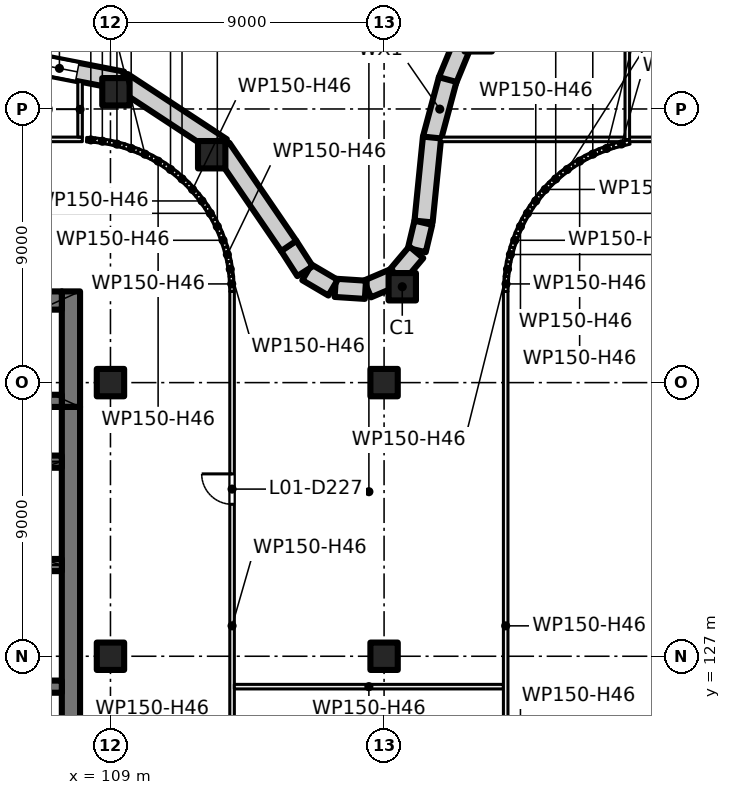
"""IFC4 building model, lengths in metres.
Left out: names, types, materials, properties, quantities, classifications, styles, units other than length and angle.
Written with IfcOpenShell. Run it as: python <this file> out.ifc"""

import sys

from ifc_helpers import new_model, si_unit, direction, frame, frame_2d, origin, origin_2d, place, context, subcontext, project, spatial, rectangle, extrude, element, fill, save


model = new_model("IFC4")
c1 = context("Model", 3, precision=1e-05, world=origin(), true_north=direction((0.0, 1.0)))
c2 = subcontext(c1, "Body", "Model", "MODEL_VIEW")
j1 = project(units=[si_unit("LENGTHUNIT", "METRE"), si_unit("PLANEANGLEUNIT", "RADIAN")], contexts=[c1])
p1 = place(None, origin())
s1 = spatial("IfcSite", under=j1, at=p1, CompositionType="ELEMENT")
p2 = place(p1, origin())
s2 = spatial("IfcBuilding", under=s1, at=p2, CompositionType="ELEMENT")
p3 = place(p2, frame((0.0, 0.0, 7.5)))
s3 = spatial("IfcBuildingStorey", under=s2, at=p3, CompositionType="ELEMENT", Elevation=7.5)
for number, where, z_axis, x_axis in (
    (1, (109.0, 127.0, 0.0), (0.0, 0.0, 1.0), (1.0, 0.0, 0.0)),
    (2, (109.0, 136.0, 0.0), (0.0, 0.0, 1.0), (1.0, 0.0, 0.0)),
    (3, (118.0, 127.0, 0.0), (0.0, 0.0, 1.0), (1.0, 0.0, 0.0)),
    (4, (118.0, 136.0, 0.0), (0.0, 0.0, 1.0), (1.0, 0.0, 0.0)),
    (5, (109.18, 145.567, 0.0), (0.0, 0.0, 1.0), (1.0, 0.0, 0.0)),
    (6, (112.329, 143.496, 0.0), (0.0, 0.0, 1.0), (1.0, 0.0, 0.0)),
    (7, (118.598, 139.153, 0.0), (0.0, 0.0, 1.0), (1.0, 0.0, 0.0)),
):
    element("IfcColumn", number, at=place(p3, frame(where, z_axis=z_axis, x_axis=x_axis)), inside=s3, PredefinedType="COLUMN", context=c2, shape_type="SweptSolid", body=[
        extrude(rectangle(XDim=0.9, YDim=0.9, at=origin_2d()), origin(), (0.0, 0.0, 1.0), 5.0),
    ])
p4 = place(p3, frame((107.7, 139.0, 0.0), z_axis=(0.0, 0.0, 1.0), x_axis=(0.0, -1.0, 0.0)))
e8 = element("IfcWall", 8, at=p4, inside=s3, PredefinedType="SHEAR", context=c2, shape_type="SweptSolid", body=[
    extrude(rectangle(XDim=3.8, YDim=0.6, at=frame_2d((1.9, 0.0))), origin(), (0.0, 0.0, 1.0), 5.0),
])
p5 = place(p3, frame((107.7, 135.2, 0.0), z_axis=(0.0, 0.0, 1.0), x_axis=(0.0, -1.0, 0.0)))
e9 = element("IfcWall", 9, at=p5, inside=s3, PredefinedType="SHEAR", context=c2, shape_type="SweptSolid", body=[
    extrude(rectangle(XDim=14.4, YDim=0.6, at=frame_2d((7.2, 0.0))), origin(), (0.0, 0.0, 1.0), 5.0),
])
p6 = place(p3, frame((107.4, 138.7, 0.0), z_axis=(0.0, 0.0, 1.0), x_axis=(-1.0, 0.0, 0.0)))
e10 = element("IfcWall", 10, at=p6, inside=s3, PredefinedType="SHEAR", context=c2, shape_type="SweptSolid", body=[
    extrude(rectangle(XDim=7.8, YDim=0.6, at=frame_2d((3.9, 0.0))), origin(), (0.0, 0.0, 1.0), 5.0),
])
p7 = place(p3, frame((107.4, 135.4, 0.0), z_axis=(0.0, 0.0, 1.0), x_axis=(-1.0, 0.0, 0.0)))
e11 = element("IfcWall", 11, at=p7, inside=s3, PredefinedType="SHEAR", context=c2, shape_type="SweptSolid", body=[
    extrude(rectangle(XDim=7.8, YDim=0.4, at=frame_2d((3.9, 0.0))), origin(), (0.0, 0.0, 1.0), 5.0),
])
p8 = place(p3, frame((107.4, 130.0, 0.0), z_axis=(0.0, 0.0, 1.0), x_axis=(-1.0, 0.0, 0.0)))
e12 = element("IfcWall", 12, at=p8, inside=s3, PredefinedType="SHEAR", context=c2, shape_type="SweptSolid", body=[
    extrude(rectangle(XDim=12.2, YDim=0.4, at=frame_2d((6.1, 0.0))), origin(), (0.0, 0.0, 1.0), 5.0),
])
p9 = place(p8, frame((5.45, 0.0, 0.0)))
e13 = element("IfcOpeningElement", 13, at=p9, cuts=e12, PredefinedType="OPENING", context=c2, shape_type="SweptSolid", body=[
    extrude(rectangle(XDim=1.1, YDim=2.1, at=frame_2d((0.55, 1.05))), frame((0.0, 0.21, 0.0), z_axis=(0.0, -1.0, 0.0), x_axis=(1.0, 0.0, 0.0)), (0.0, 0.0, 1.0), 0.42),
])
p10 = place(p8, frame((7.85, 0.0, 0.0)))
e14 = element("IfcOpeningElement", 14, at=p10, cuts=e12, PredefinedType="OPENING", context=c2, shape_type="SweptSolid", body=[
    extrude(rectangle(XDim=1.1, YDim=2.1, at=frame_2d((0.55, 1.05))), frame((0.0, 0.21, 0.0), z_axis=(0.0, -1.0, 0.0), x_axis=(1.0, 0.0, 0.0)), (0.0, 0.0, 1.0), 0.42),
])
p11 = place(p3, frame((107.4, 133.4, 0.0), z_axis=(0.0, 0.0, 1.0), x_axis=(-1.0, 0.0, 0.0)))
e15 = element("IfcWall", 15, at=p11, inside=s3, PredefinedType="SHEAR", context=c2, shape_type="SweptSolid", body=[
    extrude(rectangle(XDim=12.2, YDim=0.4, at=frame_2d((6.1, 0.0))), origin(), (0.0, 0.0, 1.0), 5.0),
])
p12 = place(p11, frame((10.3, 0.0, 0.0)))
e16 = element("IfcOpeningElement", 16, at=p12, cuts=e15, PredefinedType="OPENING", context=c2, shape_type="SweptSolid", body=[
    extrude(rectangle(XDim=1.1, YDim=2.1, at=frame_2d((0.55, 1.05))), frame((0.0, 0.21, 0.0), z_axis=(0.0, -1.0, 0.0), x_axis=(1.0, 0.0, 0.0)), (0.0, 0.0, 1.0), 0.42),
])
p13 = place(p3, frame((107.4, 126.0, 0.0), z_axis=(0.0, 0.0, 1.0), x_axis=(-1.0, 0.0, 0.0)))
e17 = element("IfcWall", 17, at=p13, inside=s3, PredefinedType="SHEAR", context=c2, shape_type="SweptSolid", body=[
    extrude(rectangle(XDim=12.2, YDim=0.4, at=frame_2d((6.1, 0.0))), origin(), (0.0, 0.0, 1.0), 5.0),
])
p14 = place(p13, frame((10.25, 0.0, 0.0)))
e18 = element("IfcOpeningElement", 18, at=p14, cuts=e17, PredefinedType="OPENING", context=c2, shape_type="SweptSolid", body=[
    extrude(rectangle(XDim=1.1, YDim=2.1, at=frame_2d((0.55, 1.05))), frame((0.0, 0.21, 0.0), z_axis=(0.0, -1.0, 0.0), x_axis=(1.0, 0.0, 0.0)), (0.0, 0.0, 1.0), 0.42),
])
p15 = place(p13, frame((0.7, 0.0, 0.0)))
e19 = element("IfcOpeningElement", 19, at=p15, cuts=e17, PredefinedType="OPENING", context=c2, shape_type="SweptSolid", body=[
    extrude(rectangle(XDim=0.8, YDim=2.1, at=frame_2d((0.4, 1.05))), frame((0.0, 0.21, 0.0), z_axis=(0.0, -1.0, 0.0), x_axis=(1.0, 0.0, 0.0)), (0.0, 0.0, 1.0), 0.42),
])
p16 = place(p3, frame((120.079, 145.931, 0.0), z_axis=(0.0, 0.0, 1.0), x_axis=(0.382375593358, 0.924006983526, 0.0)))
e20 = element("IfcWall", 20, at=p16, inside=s3, PredefinedType="SOLIDWALL", context=c2, shape_type="SweptSolid", body=[
    extrude(rectangle(XDim=2.114, YDim=0.6, at=frame_2d((1.057, 0.0))), origin(), (0.0, 0.0, 1.0), 4.6),
])
p17 = place(p3, frame((119.571, 144.024, 0.0), z_axis=(0.0, 0.0, 1.0), x_axis=(0.25888565912, 0.965907974655, 0.0)))
e21 = element("IfcWall", 21, at=p17, inside=s3, PredefinedType="SOLIDWALL", context=c2, shape_type="SweptSolid", body=[
    extrude(rectangle(XDim=2.012, YDim=0.6, at=frame_2d((1.006, 0.0))), origin(), (0.0, 0.0, 1.0), 4.6),
])
p18 = place(p3, frame((119.299, 141.298, 0.0), z_axis=(0.0, 0.0, 1.0), x_axis=(0.100121632527, 0.994975205068, 0.0)))
e22 = element("IfcWall", 22, at=p18, inside=s3, PredefinedType="SOLIDWALL", context=c2, shape_type="SweptSolid", body=[
    extrude(rectangle(XDim=2.777, YDim=0.6, at=frame_2d((1.389, 0.0))), origin(), (0.0, 0.0, 1.0), 4.6),
])
p19 = place(p3, frame((119.077, 140.358, 0.0), z_axis=(0.0, 0.0, 1.0), x_axis=(0.231477954295, 0.972840149601, 0.0)))
e23 = element("IfcWall", 23, at=p19, inside=s3, PredefinedType="SOLIDWALL", context=c2, shape_type="SweptSolid", body=[
    extrude(rectangle(XDim=0.926, YDim=0.6, at=frame_2d((0.463, 0.0))), origin(), (0.0, 0.0, 1.0), 4.6),
])
for number, where, z_axis, x_axis in (
    (24, (118.417, 139.526, 0.0), (0.0, 0.0, 1.0), (0.645, 0.764, 0.0)),
    (25, (117.454, 139.081, 0.0), (0.0, 0.0, 1.0), (0.92, 0.392, 0.0)),
    (26, (116.393, 139.117, 0.0), (0.0, 0.0, 1.0), (0.998, -0.064, 0.0)),
    (27, (115.461, 139.627, 0.0), (0.0, 0.0, 1.0), (0.862, -0.507, 0.0)),
):
    element("IfcWall", number, at=place(p3, frame(where, z_axis=z_axis, x_axis=x_axis)), inside=s3, PredefinedType="SOLIDWALL", context=c2, shape_type="SweptSolid", body=[
        extrude(rectangle(XDim=0.996, YDim=0.6, at=frame_2d((0.498, 0.0))), origin(), (0.0, 0.0, 1.0), 4.6),
    ])
p20 = place(p3, frame((114.86, 140.502, 0.0), z_axis=(0.0, 0.0, 1.0), x_axis=(0.541339592117, -0.84080404733, 0.0)))
e28 = element("IfcWall", 28, at=p20, inside=s3, PredefinedType="SOLIDWALL", context=c2, shape_type="SweptSolid", body=[
    extrude(rectangle(XDim=0.996, YDim=0.6, at=frame_2d((0.498, 0.0))), origin(), (0.0, 0.0, 1.0), 4.6),
])
p21 = place(p3, frame((112.661, 143.72, 0.0), z_axis=(0.0, 0.0, 1.0), x_axis=(0.564314082571, -0.825560183277, 0.0)))
e29 = element("IfcWall", 29, at=p21, inside=s3, PredefinedType="SOLIDWALL", context=c2, shape_type="SweptSolid", body=[
    extrude(rectangle(XDim=3.905, YDim=0.6, at=frame_2d((1.953, 0.0))), origin(), (0.0, 0.0, 1.0), 4.6),
])
p22 = place(p3, frame((109.401, 145.9, 0.0), z_axis=(0.0, 0.0, 1.0), x_axis=(0.835543958523, -0.549423601037, 0.0)))
e30 = element("IfcWall", 30, at=p22, inside=s3, PredefinedType="SOLIDWALL", context=c2, shape_type="SweptSolid", body=[
    extrude(rectangle(XDim=3.906, YDim=0.6, at=frame_2d((1.953, 0.0))), origin(), (0.0, 0.0, 1.0), 4.6),
])
p23 = place(p3, frame((105.44, 146.702, 0.0), z_axis=(0.0, 0.0, 1.0), x_axis=(0.981593603981, -0.190981665674, 0.0)))
e31 = element("IfcWall", 31, at=p23, inside=s3, PredefinedType="SOLIDWALL", context=c2, shape_type="SweptSolid", body=[
    extrude(rectangle(XDim=4.025, YDim=0.6, at=frame_2d((2.013, 0.0))), origin(), (0.0, 0.0, 1.0), 4.6),
])
p24 = place(p23, frame((1.316, 0.0, 0.9)))
e32 = element("IfcOpeningElement", 32, at=p24, cuts=e31, PredefinedType="OPENING", context=c2, shape_type="SweptSolid", body=[
    extrude(rectangle(XDim=1.2, YDim=3.0, at=frame_2d((0.6, 1.5))), frame((0.0, 0.31, 0.0), z_axis=(0.0, -1.0, 0.0), x_axis=(1.0, 0.0, 0.0)), (0.0, 0.0, 1.0), 0.62),
])
p25 = place(p3, frame((72.075, 144.0, 0.0), z_axis=(0.0, 0.0, 1.0), x_axis=(1.0, 0.0, 0.0)))
e33 = element("IfcWall", 33, at=p25, inside=s3, PredefinedType="PARTITIONING", context=c2, shape_type="SweptSolid", body=[
    extrude(rectangle(XDim=36.0, YDim=0.15, at=frame_2d((18.0, 0.0))), origin(), (0.0, 0.0, 1.0), 4.6),
])
p26 = place(p25, frame((26.925, 0.0, 0.0)))
e34 = element("IfcOpeningElement", 34, at=p26, cuts=e33, PredefinedType="OPENING", context=c2, shape_type="SweptSolid", body=[
    extrude(rectangle(XDim=1.0, YDim=2.1, at=frame_2d((0.5, 1.05))), frame((0.0, 0.085, 0.0), z_axis=(0.0, -1.0, 0.0), x_axis=(1.0, 0.0, 0.0)), (0.0, 0.0, 1.0), 0.17),
])
p27 = place(p3, frame((108.0, 144.075, 0.0), z_axis=(0.0, 0.0, 1.0), x_axis=(0.0, 1.0, 0.0)))
e35 = element("IfcWall", 35, at=p27, inside=s3, PredefinedType="PARTITIONING", context=c2, shape_type="SweptSolid", body=[
    extrude(rectangle(XDim=1.823, YDim=0.15, at=frame_2d((0.912, 0.0))), origin(), (0.0, 0.0, 1.0), 4.6),
])
p28 = place(p3, frame((108.214, 143.99, 0.0), z_axis=(0.0, 0.0, 1.0), x_axis=(0.99876534507, -0.049676810357, 0.0)))
e36 = element("IfcWall", 36, at=p28, inside=s3, PredefinedType="PARTITIONING", context=c2, shape_type="SweptSolid", body=[
    extrude(rectangle(XDim=0.28, YDim=0.15, at=frame_2d((0.14, 0.0))), origin(), (0.0, 0.0, 1.0), 4.6),
])
p29 = place(p3, frame((108.486, 143.977, 0.0), z_axis=(0.0, 0.0, 1.0), x_axis=(0.988925572052, -0.148412307247, 0.0)))
e37 = element("IfcWall", 37, at=p29, inside=s3, PredefinedType="PARTITIONING", context=c2, shape_type="SweptSolid", body=[
    extrude(rectangle(XDim=0.499, YDim=0.15, at=frame_2d((0.249, 0.0))), origin(), (0.0, 0.0, 1.0), 4.6),
])
p30 = place(p3, frame((108.971, 143.905, 0.0), z_axis=(0.0, 0.0, 1.0), x_axis=(0.970113715952, -0.242650732785, 0.0)))
e38 = element("IfcWall", 38, at=p30, inside=s3, PredefinedType="PARTITIONING", context=c2, shape_type="SweptSolid", body=[
    extrude(rectangle(XDim=0.499, YDim=0.15, at=frame_2d((0.25, 0.0))), origin(), (0.0, 0.0, 1.0), 4.6),
])
for number, where, z_axis, x_axis in (
    (39, (109.447, 143.786, 0.0), (0.0, 0.0, 1.0), (0.941, -0.337, 0.0)),
    (40, (109.91, 143.621, 0.0), (0.0, 0.0, 1.0), (0.904, -0.428, 0.0)),
):
    element("IfcWall", number, at=place(p3, frame(where, z_axis=z_axis, x_axis=x_axis)), inside=s3, PredefinedType="PARTITIONING", context=c2, shape_type="SweptSolid", body=[
        extrude(rectangle(XDim=0.498, YDim=0.15, at=frame_2d((0.249, 0.0))), origin(), (0.0, 0.0, 1.0), 4.6),
    ])
p31 = place(p3, frame((110.354, 143.412, 0.0), z_axis=(0.0, 0.0, 1.0), x_axis=(0.85671397893, -0.515791778052, 0.0)))
e41 = element("IfcWall", 41, at=p31, inside=s3, PredefinedType="PARTITIONING", context=c2, shape_type="SweptSolid", body=[
    extrude(rectangle(XDim=0.499, YDim=0.15, at=frame_2d((0.249, 0.0))), origin(), (0.0, 0.0, 1.0), 4.6),
])
p32 = place(p3, frame((110.775, 143.159, 0.0), z_axis=(0.0, 0.0, 1.0), x_axis=(0.80404358372, -0.594570362092, 0.0)))
e42 = element("IfcWall", 42, at=p32, inside=s3, PredefinedType="PARTITIONING", context=c2, shape_type="SweptSolid", body=[
    extrude(rectangle(XDim=0.498, YDim=0.15, at=frame_2d((0.249, 0.0))), origin(), (0.0, 0.0, 1.0), 4.6),
])
for number, where, z_axis, x_axis in (
    (43, (111.169, 142.867, 0.0), (0.0, 0.0, 1.0), (0.742, -0.67, 0.0)),
    (44, (111.533, 142.539, 0.0), (0.0, 0.0, 1.0), (0.67, -0.742, 0.0)),
):
    element("IfcWall", number, at=place(p3, frame(where, z_axis=z_axis, x_axis=x_axis)), inside=s3, PredefinedType="PARTITIONING", context=c2, shape_type="SweptSolid", body=[
        extrude(rectangle(XDim=0.499, YDim=0.15, at=frame_2d((0.249, 0.0))), origin(), (0.0, 0.0, 1.0), 4.6),
    ])
p33 = place(p3, frame((111.863, 142.175, 0.0), z_axis=(0.0, 0.0, 1.0), x_axis=(0.594570362092, -0.80404358372, 0.0)))
e45 = element("IfcWall", 45, at=p33, inside=s3, PredefinedType="PARTITIONING", context=c2, shape_type="SweptSolid", body=[
    extrude(rectangle(XDim=0.498, YDim=0.15, at=frame_2d((0.249, 0.0))), origin(), (0.0, 0.0, 1.0), 4.6),
])
p34 = place(p3, frame((112.155, 141.781, 0.0), z_axis=(0.0, 0.0, 1.0), x_axis=(0.515791778052, -0.85671397893, 0.0)))
e46 = element("IfcWall", 46, at=p34, inside=s3, PredefinedType="PARTITIONING", context=c2, shape_type="SweptSolid", body=[
    extrude(rectangle(XDim=0.499, YDim=0.15, at=frame_2d((0.249, 0.0))), origin(), (0.0, 0.0, 1.0), 4.6),
])
for number, where, z_axis, x_axis in (
    (47, (112.408, 141.36, 0.0), (0.0, 0.0, 1.0), (0.428, -0.904, 0.0)),
    (48, (112.618, 140.916, 0.0), (0.0, 0.0, 1.0), (0.337, -0.941, 0.0)),
):
    element("IfcWall", number, at=place(p3, frame(where, z_axis=z_axis, x_axis=x_axis)), inside=s3, PredefinedType="PARTITIONING", context=c2, shape_type="SweptSolid", body=[
        extrude(rectangle(XDim=0.498, YDim=0.15, at=frame_2d((0.249, 0.0))), origin(), (0.0, 0.0, 1.0), 4.6),
    ])
p35 = place(p3, frame((112.784, 140.455, 0.0), z_axis=(0.0, 0.0, 1.0), x_axis=(0.242650732785, -0.970113715952, 0.0)))
e49 = element("IfcWall", 49, at=p35, inside=s3, PredefinedType="PARTITIONING", context=c2, shape_type="SweptSolid", body=[
    extrude(rectangle(XDim=0.499, YDim=0.15, at=frame_2d((0.25, 0.0))), origin(), (0.0, 0.0, 1.0), 4.6),
])
p36 = place(p3, frame((112.903, 139.979, 0.0), z_axis=(0.0, 0.0, 1.0), x_axis=(0.148412307247, -0.988925572052, 0.0)))
e50 = element("IfcWall", 50, at=p36, inside=s3, PredefinedType="PARTITIONING", context=c2, shape_type="SweptSolid", body=[
    extrude(rectangle(XDim=0.499, YDim=0.15, at=frame_2d((0.249, 0.0))), origin(), (0.0, 0.0, 1.0), 4.6),
])
p37 = place(p3, frame((112.976, 139.494, 0.0), z_axis=(0.0, 0.0, 1.0), x_axis=(0.048196018647, -0.998837896651, 0.0)))
e51 = element("IfcWall", 51, at=p37, inside=s3, PredefinedType="PARTITIONING", context=c2, shape_type="SweptSolid", body=[
    extrude(rectangle(XDim=0.496, YDim=0.15, at=frame_2d((0.248, 0.0))), origin(), (0.0, 0.0, 1.0), 4.6),
])
p38 = place(p3, frame((113.0, 139.002, 0.0), z_axis=(0.0, 0.0, 1.0), x_axis=(0.0, -1.0, 0.0)))
e52 = element("IfcWall", 52, at=p38, inside=s3, PredefinedType="PARTITIONING", context=c2, shape_type="SweptSolid", body=[
    extrude(rectangle(XDim=22.004, YDim=0.15, at=frame_2d((11.002, 0.0))), origin(), (0.0, 0.0, 1.0), 4.6),
])
p39 = place(p38, frame((17.0, 0.0, 0.0)))
e53 = element("IfcOpeningElement", 53, at=p39, cuts=e52, PredefinedType="OPENING", context=c2, shape_type="SweptSolid", body=[
    extrude(rectangle(XDim=1.0, YDim=2.1, at=frame_2d((0.5, 1.05))), frame((0.0, 0.085, 0.0), z_axis=(0.0, -1.0, 0.0), x_axis=(1.0, 0.0, 0.0)), (0.0, 0.0, 1.0), 0.17),
])
p40 = place(p38, frame((6.004, 0.0, 0.0)))
e54 = element("IfcOpeningElement", 54, at=p40, cuts=e52, PredefinedType="OPENING", context=c2, shape_type="SweptSolid", body=[
    extrude(rectangle(XDim=1.0, YDim=2.1, at=frame_2d((0.5, 1.05))), frame((0.0, 0.085, 0.0), z_axis=(0.0, -1.0, 0.0), x_axis=(1.0, 0.0, 0.0)), (0.0, 0.0, 1.0), 0.17),
])
p41 = place(p3, frame((113.075, 126.0, 0.0), z_axis=(0.0, 0.0, 1.0), x_axis=(1.0, 0.0, 0.0)))
e55 = element("IfcWall", 55, at=p41, inside=s3, PredefinedType="PARTITIONING", context=c2, shape_type="SweptSolid", body=[
    extrude(rectangle(XDim=8.85, YDim=0.15, at=frame_2d((4.425, 0.0))), origin(), (0.0, 0.0, 1.0), 4.6),
])
p42 = place(p3, frame((119.875, 144.0, 0.0), z_axis=(0.0, 0.0, 1.0), x_axis=(1.0, 0.0, 0.0)))
e56 = element("IfcWall", 56, at=p42, inside=s3, PredefinedType="PARTITIONING", context=c2, shape_type="SweptSolid", body=[
    extrude(rectangle(XDim=20.05, YDim=0.15, at=frame_2d((10.025, 0.0))), origin(), (0.0, 0.0, 1.0), 4.6),
])
p43 = place(p42, frame((13.125, 0.0, 0.0)))
e57 = element("IfcOpeningElement", 57, at=p43, cuts=e56, PredefinedType="OPENING", context=c2, shape_type="SweptSolid", body=[
    extrude(rectangle(XDim=1.0, YDim=2.1, at=frame_2d((0.5, 1.05))), frame((0.0, 0.085, 0.0), z_axis=(0.0, -1.0, 0.0), x_axis=(1.0, 0.0, 0.0)), (0.0, 0.0, 1.0), 0.17),
])
p44 = place(p3, frame((122.0, 116.998, 0.0), z_axis=(0.0, 0.0, 1.0), x_axis=(0.0, 1.0, 0.0)))
e58 = element("IfcWall", 58, at=p44, inside=s3, PredefinedType="PARTITIONING", context=c2, shape_type="SweptSolid", body=[
    extrude(rectangle(XDim=22.004, YDim=0.15, at=frame_2d((11.002, 0.0))), origin(), (0.0, 0.0, 1.0), 4.6),
])
p45 = place(p3, frame((122.0, 138.998, 0.0), z_axis=(0.0, 0.0, 1.0), x_axis=(0.048196018647, 0.998837896651, 0.0)))
e59 = element("IfcWall", 59, at=p45, inside=s3, PredefinedType="PARTITIONING", context=c2, shape_type="SweptSolid", body=[
    extrude(rectangle(XDim=0.496, YDim=0.15, at=frame_2d((0.248, 0.0))), origin(), (0.0, 0.0, 1.0), 4.6),
])
p46 = place(p3, frame((122.023, 139.486, 0.0), z_axis=(0.0, 0.0, 1.0), x_axis=(0.148412307247, 0.988925572052, 0.0)))
e60 = element("IfcWall", 60, at=p46, inside=s3, PredefinedType="PARTITIONING", context=c2, shape_type="SweptSolid", body=[
    extrude(rectangle(XDim=0.499, YDim=0.15, at=frame_2d((0.249, 0.0))), origin(), (0.0, 0.0, 1.0), 4.6),
])
p47 = place(p3, frame((122.095, 139.971, 0.0), z_axis=(0.0, 0.0, 1.0), x_axis=(0.242650732785, 0.970113715952, 0.0)))
e61 = element("IfcWall", 61, at=p47, inside=s3, PredefinedType="PARTITIONING", context=c2, shape_type="SweptSolid", body=[
    extrude(rectangle(XDim=0.499, YDim=0.15, at=frame_2d((0.25, 0.0))), origin(), (0.0, 0.0, 1.0), 4.6),
])
for number, where, z_axis, x_axis in (
    (62, (122.214, 140.447, 0.0), (0.0, 0.0, 1.0), (0.337, 0.941, 0.0)),
    (63, (122.379, 140.91, 0.0), (0.0, 0.0, 1.0), (0.428, 0.904, 0.0)),
):
    element("IfcWall", number, at=place(p3, frame(where, z_axis=z_axis, x_axis=x_axis)), inside=s3, PredefinedType="PARTITIONING", context=c2, shape_type="SweptSolid", body=[
        extrude(rectangle(XDim=0.498, YDim=0.15, at=frame_2d((0.249, 0.0))), origin(), (0.0, 0.0, 1.0), 4.6),
    ])
p48 = place(p3, frame((122.588, 141.354, 0.0), z_axis=(0.0, 0.0, 1.0), x_axis=(0.515791778052, 0.85671397893, 0.0)))
e64 = element("IfcWall", 64, at=p48, inside=s3, PredefinedType="PARTITIONING", context=c2, shape_type="SweptSolid", body=[
    extrude(rectangle(XDim=0.499, YDim=0.15, at=frame_2d((0.249, 0.0))), origin(), (0.0, 0.0, 1.0), 4.6),
])
p49 = place(p3, frame((122.841, 141.775, 0.0), z_axis=(0.0, 0.0, 1.0), x_axis=(0.594570362092, 0.80404358372, 0.0)))
e65 = element("IfcWall", 65, at=p49, inside=s3, PredefinedType="PARTITIONING", context=c2, shape_type="SweptSolid", body=[
    extrude(rectangle(XDim=0.498, YDim=0.15, at=frame_2d((0.249, 0.0))), origin(), (0.0, 0.0, 1.0), 4.6),
])
for number, where, z_axis, x_axis in (
    (66, (123.133, 142.169, 0.0), (0.0, 0.0, 1.0), (0.67, 0.742, 0.0)),
    (67, (123.461, 142.533, 0.0), (0.0, 0.0, 1.0), (0.742, 0.67, 0.0)),
):
    element("IfcWall", number, at=place(p3, frame(where, z_axis=z_axis, x_axis=x_axis)), inside=s3, PredefinedType="PARTITIONING", context=c2, shape_type="SweptSolid", body=[
        extrude(rectangle(XDim=0.499, YDim=0.15, at=frame_2d((0.249, 0.0))), origin(), (0.0, 0.0, 1.0), 4.6),
    ])
p50 = place(p3, frame((123.825, 142.863, 0.0), z_axis=(0.0, 0.0, 1.0), x_axis=(0.80404358372, 0.594570362092, 0.0)))
e68 = element("IfcWall", 68, at=p50, inside=s3, PredefinedType="PARTITIONING", context=c2, shape_type="SweptSolid", body=[
    extrude(rectangle(XDim=0.498, YDim=0.15, at=frame_2d((0.249, 0.0))), origin(), (0.0, 0.0, 1.0), 4.6),
])
p51 = place(p3, frame((124.219, 143.155, 0.0), z_axis=(0.0, 0.0, 1.0), x_axis=(0.85671397893, 0.515791778052, 0.0)))
e69 = element("IfcWall", 69, at=p51, inside=s3, PredefinedType="PARTITIONING", context=c2, shape_type="SweptSolid", body=[
    extrude(rectangle(XDim=0.499, YDim=0.15, at=frame_2d((0.249, 0.0))), origin(), (0.0, 0.0, 1.0), 4.6),
])
for number, where, z_axis, x_axis in (
    (70, (124.64, 143.408, 0.0), (0.0, 0.0, 1.0), (0.904, 0.428, 0.0)),
    (71, (125.084, 143.618, 0.0), (0.0, 0.0, 1.0), (0.941, 0.337, 0.0)),
):
    element("IfcWall", number, at=place(p3, frame(where, z_axis=z_axis, x_axis=x_axis)), inside=s3, PredefinedType="PARTITIONING", context=c2, shape_type="SweptSolid", body=[
        extrude(rectangle(XDim=0.498, YDim=0.15, at=frame_2d((0.249, 0.0))), origin(), (0.0, 0.0, 1.0), 4.6),
    ])
p52 = place(p3, frame((125.545, 143.784, 0.0), z_axis=(0.0, 0.0, 1.0), x_axis=(0.970116111764, 0.242641154168, 0.0)))
e72 = element("IfcWall", 72, at=p52, inside=s3, PredefinedType="PARTITIONING", context=c2, shape_type="SweptSolid", body=[
    extrude(rectangle(XDim=0.544, YDim=0.15, at=frame_2d((0.272, 0.0))), origin(), (0.0, 0.0, 1.0), 4.6),
])
p53 = place(p3, frame((126.0, 143.995, 0.0), z_axis=(0.0, 0.0, 1.0), x_axis=(0.0, 1.0, 0.0)))
e73 = element("IfcWall", 73, at=p53, inside=s3, PredefinedType="PARTITIONING", context=c2, shape_type="SweptSolid", body=[
    extrude(rectangle(XDim=8.159, YDim=0.15, at=frame_2d((4.08, 0.0))), origin(), (0.0, 0.0, 1.0), 4.6),
])
p54 = place(p24, origin())
e74 = element("IfcWindow", 74, at=p54, inside=s3, PartitioningType="SINGLE_PANEL", PredefinedType="WINDOW", context=c2, shape_type="SweptSolid", body=[
    extrude(rectangle(XDim=1.2, YDim=3.0, at=frame_2d((0.6, 1.5))), frame((0.0, 0.03, 0.0), z_axis=(0.0, -1.0, 0.0), x_axis=(1.0, 0.0, 0.0)), (0.0, 0.0, 1.0), 0.06),
])
fill(e32, e74)
p55 = place(p40, origin())
e75 = element("IfcDoor", 75, at=p55, inside=s3, OperationType="SINGLE_SWING_LEFT", PredefinedType="DOOR", context=c2, shape_type="SweptSolid", body=[
    extrude(rectangle(XDim=1.0, YDim=2.1, at=frame_2d((0.5, 1.05))), frame((0.0, 0.025, 0.0), z_axis=(0.0, -1.0, 0.0), x_axis=(1.0, 0.0, 0.0)), (0.0, 0.0, 1.0), 0.05),
])
fill(e54, e75)
save(model, sys.argv[1])
